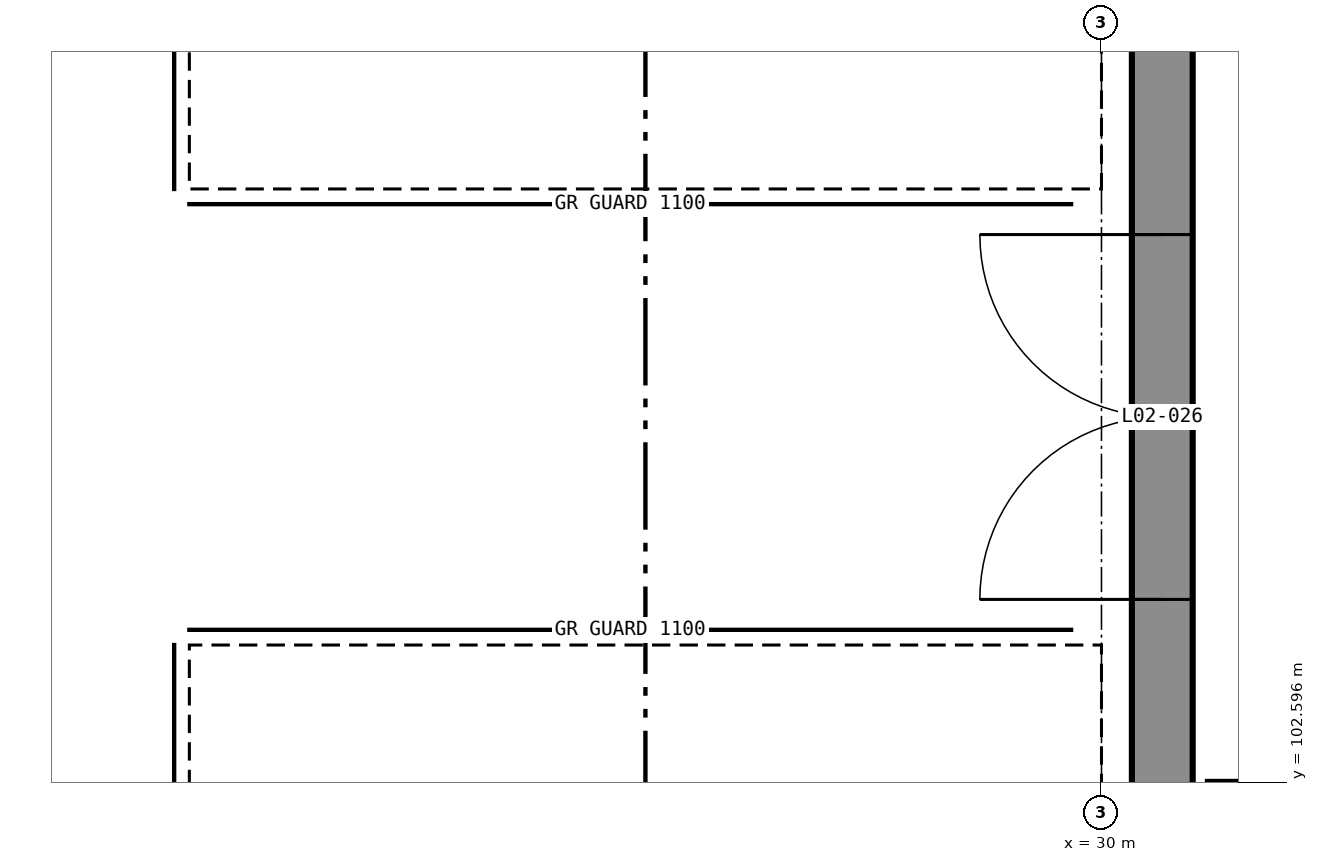
"""IFC4 building model, lengths in metres.
Left out: names, types, materials, properties, quantities, classifications, styles, units other than length and angle.
Written with IfcOpenShell. Run it as: python <this file> out.ifc"""

import sys

from ifc_helpers import new_model, si_unit, direction, frame, frame_2d, origin, place, context, subcontext, project, spatial, rectangle, extrude, element, fill, save


model = new_model("IFC4")
c1 = context("Model", 3, precision=1e-05, world=origin(), true_north=direction((0.0, 1.0)))
c2 = subcontext(c1, "Body", "Model", "MODEL_VIEW")
j1 = project(units=[si_unit("LENGTHUNIT", "METRE"), si_unit("PLANEANGLEUNIT", "RADIAN")], contexts=[c1])
p1 = place(None, origin())
s1 = spatial("IfcSite", under=j1, at=p1, CompositionType="ELEMENT")
p2 = place(p1, origin())
s2 = spatial("IfcBuilding", under=s1, at=p2, CompositionType="ELEMENT")
p3 = place(p2, frame((0.0, 0.0, 12.0)))
s3 = spatial("IfcBuildingStorey", under=s2, at=p3, CompositionType="ELEMENT", Elevation=12.0)
p4 = place(p3, frame((30.4, 102.5, 0.0), z_axis=(0.0, 0.0, 1.0), x_axis=(0.0, 1.0, 0.0)))
e1 = element("IfcWall", 1, at=p4, inside=s3, PredefinedType="SOLIDWALL", context=c2, shape_type="SweptSolid", body=[
    extrude(rectangle(XDim=11.0, YDim=0.4, at=frame_2d((5.5, 0.0))), origin(), (0.0, 0.0, 1.0), 5.0),
])
p5 = place(p4, frame((1.3, 0.0, 0.0)))
e2 = element("IfcOpeningElement", 2, at=p5, cuts=e1, PredefinedType="OPENING", context=c2, shape_type="SweptSolid", body=[
    extrude(rectangle(XDim=2.4, YDim=2.4, at=frame_2d((1.2, 1.2))), frame((0.0, 0.21, 0.0), z_axis=(0.0, -1.0, 0.0), x_axis=(1.0, 0.0, 0.0)), (0.0, 0.0, 1.0), 0.42),
])
p6 = place(p5, origin())
e3 = element("IfcDoor", 3, at=p6, inside=s3, OperationType="DOUBLE_DOOR_SINGLE_SWING", PredefinedType="DOOR", context=c2, shape_type="SweptSolid", body=[
    extrude(rectangle(XDim=2.4, YDim=2.4, at=frame_2d((1.2, 1.2))), frame((0.0, 0.025, 0.0), z_axis=(0.0, -1.0, 0.0), x_axis=(1.0, 0.0, 0.0)), (0.0, 0.0, 1.0), 0.05),
])
fill(e2, e3)
save(model, sys.argv[1])
